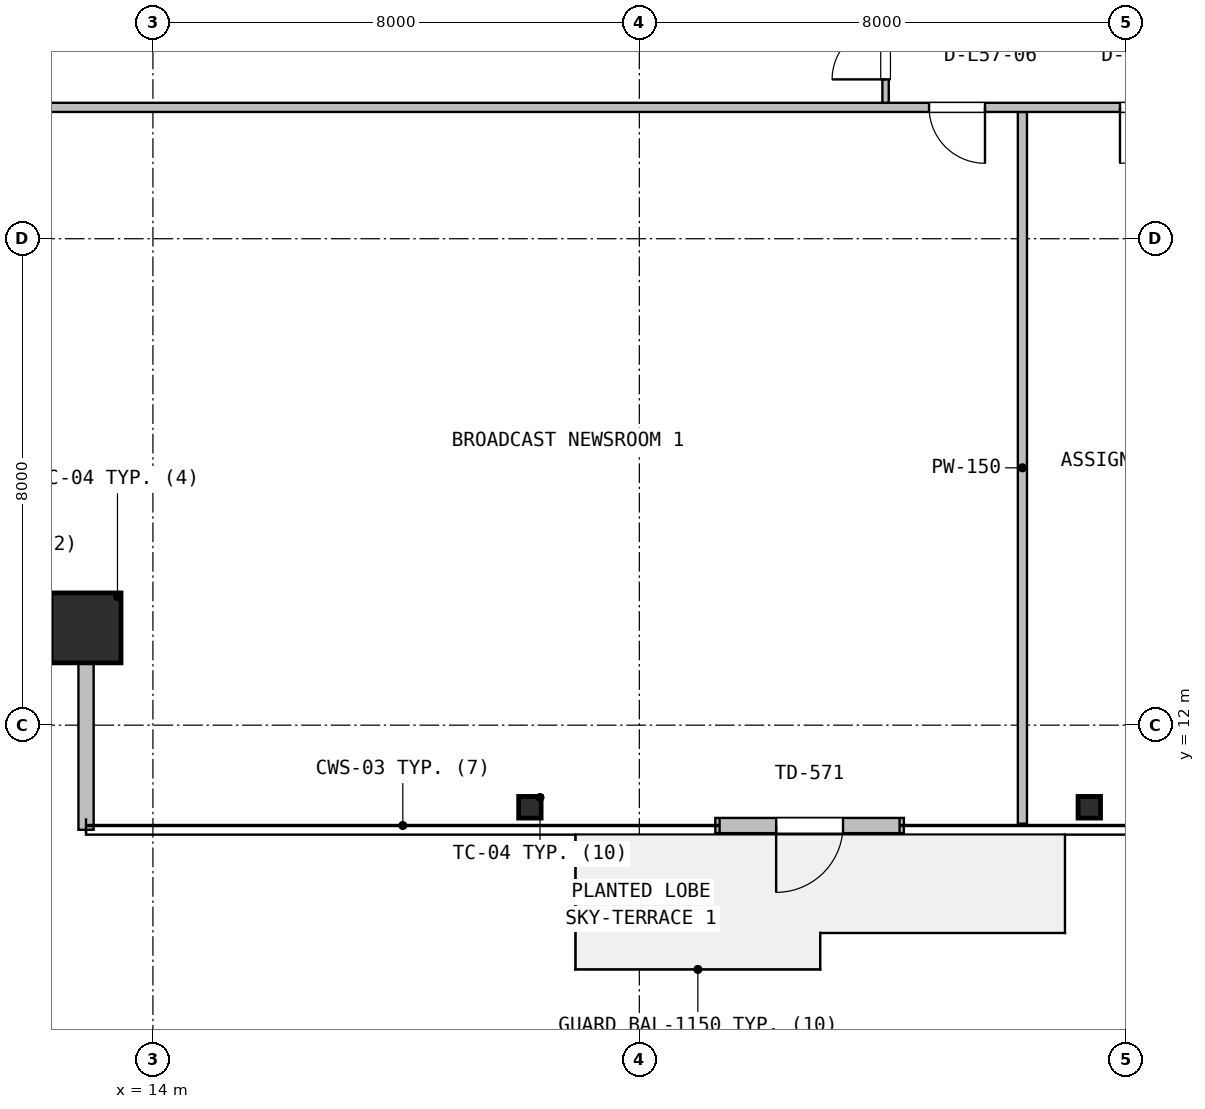
"""IFC4 building model, lengths in metres.
Left out: names, types, materials, properties, quantities, classifications, styles, units other than length and angle.
Written with IfcOpenShell. Run it as: python <this file> out.ifc"""

import sys

from ifc_helpers import new_model, si_unit, direction, frame, frame_2d, origin, origin_2d, place, context, subcontext, project, spatial, rectangle, hollow_rectangle, i_section, extrude, source, transform, mapped, element, fill, save


model = new_model("IFC4")
c1 = context("Model", 3, precision=1e-05, world=origin(), true_north=direction((0.0, 1.0)))
c2 = subcontext(c1, "Body", "Model", "MODEL_VIEW")
j1 = project(units=[si_unit("LENGTHUNIT", "METRE"), si_unit("PLANEANGLEUNIT", "RADIAN")], contexts=[c1])
p1 = place(None, origin())
s1 = spatial("IfcSite", under=j1, at=p1, CompositionType="ELEMENT")
p2 = place(p1, origin())
s2 = spatial("IfcBuilding", under=s1, at=p2, CompositionType="ELEMENT")
p3 = place(p2, frame((0.0, 0.0, 230.2)))
s3 = spatial("IfcBuildingStorey", under=s2, at=p3, CompositionType="ELEMENT", Elevation=230.2)
m1 = source(origin(), c2, "Body", "SweptSolid", [
    extrude(hollow_rectangle(XDim=1.15, YDim=1.15, WallThickness=0.045, at=origin_2d()), origin(), (0.0, 0.0, 1.0), 3.8),
])
p4 = place(p3, frame((12.9, 13.6, 0.0), z_axis=(0.0, 0.0, 1.0), x_axis=(1.0, 0.0, 0.0)))
e1 = element("IfcColumn", 1, at=p4, inside=s3, PredefinedType="COLUMN", context=c2, shape_type="MappedRepresentation", body=[
    mapped(m1, transform((0.0, 0.0, 0.0), x_axis=(1.0, 0.0, 0.0), y_axis=(0.0, 1.0, 0.0), z_axis=(0.0, 0.0, 1.0), scale=1.0)),
])
m2 = source(origin(), c2, "Body", "SweptSolid", [
    extrude(i_section(OverallWidth=0.369, OverallDepth=0.356, WebThickness=0.011, FlangeThickness=0.018, FilletRadius=0.016, at=origin_2d()), origin(), (0.0, 0.0, 1.0), 3.8),
])
for number, where, z_axis, x_axis in (
    (2, (20.2, 10.65, 0.0), (0.0, 0.0, 1.0), (1.0, 0.0, 0.0)),
    (3, (29.4, 10.65, 0.0), (0.0, 0.0, 1.0), (1.0, 0.0, 0.0)),
):
    element("IfcColumn", number, at=place(p3, frame(where, z_axis=z_axis, x_axis=x_axis)), inside=s3, PredefinedType="COLUMN", context=c2, shape_type="MappedRepresentation", body=[
        mapped(m2, transform((0.0, 0.0, 0.0), x_axis=(1.0, 0.0, 0.0), y_axis=(0.0, 1.0, 0.0), z_axis=(0.0, 0.0, 1.0), scale=1.0)),
    ])
p5 = place(p3, frame((23.25, 10.35, 0.0), z_axis=(0.0, 0.0, 1.0), x_axis=(1.0, 0.0, 0.0)))
e4 = element("IfcWall", 4, at=p5, inside=s3, PredefinedType="SOLIDWALL", context=c2, shape_type="SweptSolid", body=[
    extrude(rectangle(XDim=3.1, YDim=0.25, at=frame_2d((1.55, 0.0))), origin(), (0.0, 0.0, 1.0), 3.46),
])
p6 = place(p5, frame((1.0, 0.0, 0.0)))
e5 = element("IfcOpeningElement", 5, at=p6, cuts=e4, PredefinedType="OPENING", context=c2, shape_type="SweptSolid", body=[
    extrude(rectangle(XDim=1.1, YDim=2.15, at=frame_2d((0.55, 1.075))), frame((0.0, 0.135, 0.0), z_axis=(0.0, -1.0, 0.0), x_axis=(1.0, 0.0, 0.0)), (0.0, 0.0, 1.0), 0.27),
])
p7 = place(p3, frame((12.9, 10.28, 0.0), z_axis=(0.0, 0.0, 1.0), x_axis=(0.0, 1.0, 0.0)))
e6 = element("IfcWall", 6, at=p7, inside=s3, PredefinedType="SOLIDWALL", context=c2, shape_type="SweptSolid", body=[
    extrude(rectangle(XDim=3.4, YDim=0.25, at=frame_2d((1.7, 0.0))), origin(), (0.0, 0.0, 1.0), 3.101),
])
p8 = place(p3, frame((28.3, 10.38, 0.0), z_axis=(0.0, 0.0, 1.0), x_axis=(0.0, 1.0, 0.0)))
e7 = element("IfcWall", 7, at=p8, inside=s3, PredefinedType="PARTITIONING", context=c2, shape_type="SweptSolid", body=[
    extrude(rectangle(XDim=11.705, YDim=0.15, at=frame_2d((5.853, 0.0))), origin(), (0.0, 0.0, 1.0), 2.682),
])
p9 = place(p3, frame((9.68, 22.16, 0.0), z_axis=(0.0, 0.0, 1.0), x_axis=(1.0, 0.0, 0.0)))
e8 = element("IfcWall", 8, at=p9, inside=s3, PredefinedType="PARTITIONING", context=c2, shape_type="SweptSolid", body=[
    extrude(rectangle(XDim=48.64, YDim=0.15, at=frame_2d((24.32, 0.0))), origin(), (0.0, 0.0, 1.0), 2.838),
])
p10 = place(p9, frame((17.085, 0.0, 0.0)))
e9 = element("IfcOpeningElement", 9, at=p10, cuts=e8, PredefinedType="OPENING", context=c2, shape_type="SweptSolid", body=[
    extrude(rectangle(XDim=0.92, YDim=2.08, at=frame_2d((0.46, 1.04))), frame((0.0, 0.085, 0.0), z_axis=(0.0, -1.0, 0.0), x_axis=(1.0, 0.0, 0.0)), (0.0, 0.0, 1.0), 0.17),
])
p11 = place(p9, frame((20.225, 0.0, 0.0)))
e10 = element("IfcOpeningElement", 10, at=p11, cuts=e8, PredefinedType="OPENING", context=c2, shape_type="SweptSolid", body=[
    extrude(rectangle(XDim=0.92, YDim=2.08, at=frame_2d((0.46, 1.04))), frame((0.0, 0.085, 0.0), z_axis=(0.0, -1.0, 0.0), x_axis=(1.0, 0.0, 0.0)), (0.0, 0.0, 1.0), 0.17),
])
p12 = place(p9, frame((24.57, 0.0, 0.0)))
e11 = element("IfcOpeningElement", 11, at=p12, cuts=e8, PredefinedType="OPENING", context=c2, shape_type="SweptSolid", body=[
    extrude(rectangle(XDim=1.05, YDim=2.1, at=frame_2d((0.525, 1.05))), frame((0.0, 0.085, 0.0), z_axis=(0.0, -1.0, 0.0), x_axis=(1.0, 0.0, 0.0)), (0.0, 0.0, 1.0), 0.17),
])
p13 = place(p9, frame((28.54, 0.0, 0.0)))
e12 = element("IfcOpeningElement", 12, at=p13, cuts=e8, PredefinedType="OPENING", context=c2, shape_type="SweptSolid", body=[
    extrude(rectangle(XDim=0.88, YDim=2.06, at=frame_2d((0.44, 1.03))), frame((0.0, 0.085, 0.0), z_axis=(0.0, -1.0, 0.0), x_axis=(1.0, 0.0, 0.0)), (0.0, 0.0, 1.0), 0.17),
])
p14 = place(p9, frame((31.095, 0.0, 0.0)))
e13 = element("IfcOpeningElement", 13, at=p14, cuts=e8, PredefinedType="OPENING", context=c2, shape_type="SweptSolid", body=[
    extrude(rectangle(XDim=1.0, YDim=2.1, at=frame_2d((0.5, 1.05))), frame((0.0, 0.085, 0.0), z_axis=(0.0, -1.0, 0.0), x_axis=(1.0, 0.0, 0.0)), (0.0, 0.0, 1.0), 0.17),
])
p15 = place(p3, frame((26.05, 22.235, 0.0), z_axis=(0.0, 0.0, 1.0), x_axis=(0.0, 1.0, 0.0)))
e14 = element("IfcWall", 14, at=p15, inside=s3, PredefinedType="PARTITIONING", context=c2, shape_type="SweptSolid", body=[
    extrude(rectangle(XDim=11.04, YDim=0.105, at=frame_2d((5.52, 0.0))), origin(), (0.0, 0.0, 1.0), 2.838),
])
p16 = place(p15, frame((0.385, 0.0, 0.0)))
e15 = element("IfcOpeningElement", 15, at=p16, cuts=e14, PredefinedType="OPENING", context=c2, shape_type="SweptSolid", body=[
    extrude(rectangle(XDim=0.88, YDim=2.06, at=frame_2d((0.44, 1.03))), frame((0.0, 0.062, 0.0), z_axis=(0.0, -1.0, 0.0), x_axis=(1.0, 0.0, 0.0)), (0.0, 0.0, 1.0), 0.125),
])
p17 = place(p15, frame((3.975, 0.0, 0.0)))
e16 = element("IfcOpeningElement", 16, at=p17, cuts=e14, PredefinedType="OPENING", context=c2, shape_type="SweptSolid", body=[
    extrude(rectangle(XDim=0.92, YDim=2.08, at=frame_2d((0.46, 1.04))), frame((0.0, 0.062, 0.0), z_axis=(0.0, -1.0, 0.0), x_axis=(1.0, 0.0, 0.0)), (0.0, 0.0, 1.0), 0.125),
])
m3 = source(origin(), c2, "Body", "SweptSolid", [
    extrude(rectangle(XDim=1.1, YDim=2.15, at=frame_2d((0.55, 1.075))), frame((0.0, 0.025, 0.0), z_axis=(0.0, -1.0, 0.0), x_axis=(1.0, 0.0, 0.0)), (0.0, 0.0, 1.0), 0.05),
])
p18 = place(p6, frame((1.1, 0.0, 0.0), z_axis=(0.0, 0.0, 1.0), x_axis=(-1.0, 0.0, 0.0)))
e17 = element("IfcDoor", 17, at=p18, inside=s3, OperationType="SINGLE_SWING_LEFT", PredefinedType="DOOR", context=c2, shape_type="MappedRepresentation", body=[
    mapped(m3, transform((0.0, 0.0, 0.0), x_axis=(1.0, 0.0, 0.0), y_axis=(0.0, 1.0, 0.0), z_axis=(0.0, 0.0, 1.0), scale=1.0)),
])
fill(e5, e17)
m4 = source(origin(), c2, "Body", "SweptSolid", [
    extrude(rectangle(XDim=0.92, YDim=2.08, at=frame_2d((0.46, 1.04))), frame((0.0, 0.025, 0.0), z_axis=(0.0, -1.0, 0.0), x_axis=(1.0, 0.0, 0.0)), (0.0, 0.0, 1.0), 0.05),
])
p19 = place(p10, frame((0.92, 0.0, 0.0), z_axis=(0.0, 0.0, 1.0), x_axis=(-1.0, 0.0, 0.0)))
e18 = element("IfcDoor", 18, at=p19, inside=s3, OperationType="SINGLE_SWING_RIGHT", PredefinedType="DOOR", context=c2, shape_type="MappedRepresentation", body=[
    mapped(m4, transform((0.0, 0.0, 0.0), x_axis=(1.0, 0.0, 0.0), y_axis=(0.0, 1.0, 0.0), z_axis=(0.0, 0.0, 1.0), scale=1.0)),
])
fill(e9, e18)
p20 = place(p11, frame((0.92, 0.0, 0.0), z_axis=(0.0, 0.0, 1.0), x_axis=(-1.0, 0.0, 0.0)))
e19 = element("IfcDoor", 19, at=p20, inside=s3, OperationType="SINGLE_SWING_LEFT", PredefinedType="DOOR", context=c2, shape_type="MappedRepresentation", body=[
    mapped(m4, transform((0.0, 0.0, 0.0), x_axis=(1.0, 0.0, 0.0), y_axis=(0.0, 1.0, 0.0), z_axis=(0.0, 0.0, 1.0), scale=1.0)),
])
fill(e10, e19)
m5 = source(origin(), c2, "Body", "SweptSolid", [
    extrude(rectangle(XDim=0.88, YDim=2.06, at=frame_2d((0.44, 1.03))), frame((0.0, 0.025, 0.0), z_axis=(0.0, -1.0, 0.0), x_axis=(1.0, 0.0, 0.0)), (0.0, 0.0, 1.0), 0.05),
])
p21 = place(p16, origin())
e20 = element("IfcDoor", 20, at=p21, inside=s3, OperationType="SINGLE_SWING_LEFT", PredefinedType="DOOR", context=c2, shape_type="MappedRepresentation", body=[
    mapped(m5, transform((0.0, 0.0, 0.0), x_axis=(1.0, 0.0, 0.0), y_axis=(0.0, 1.0, 0.0), z_axis=(0.0, 0.0, 1.0), scale=1.0)),
])
fill(e15, e20)
save(model, sys.argv[1])
